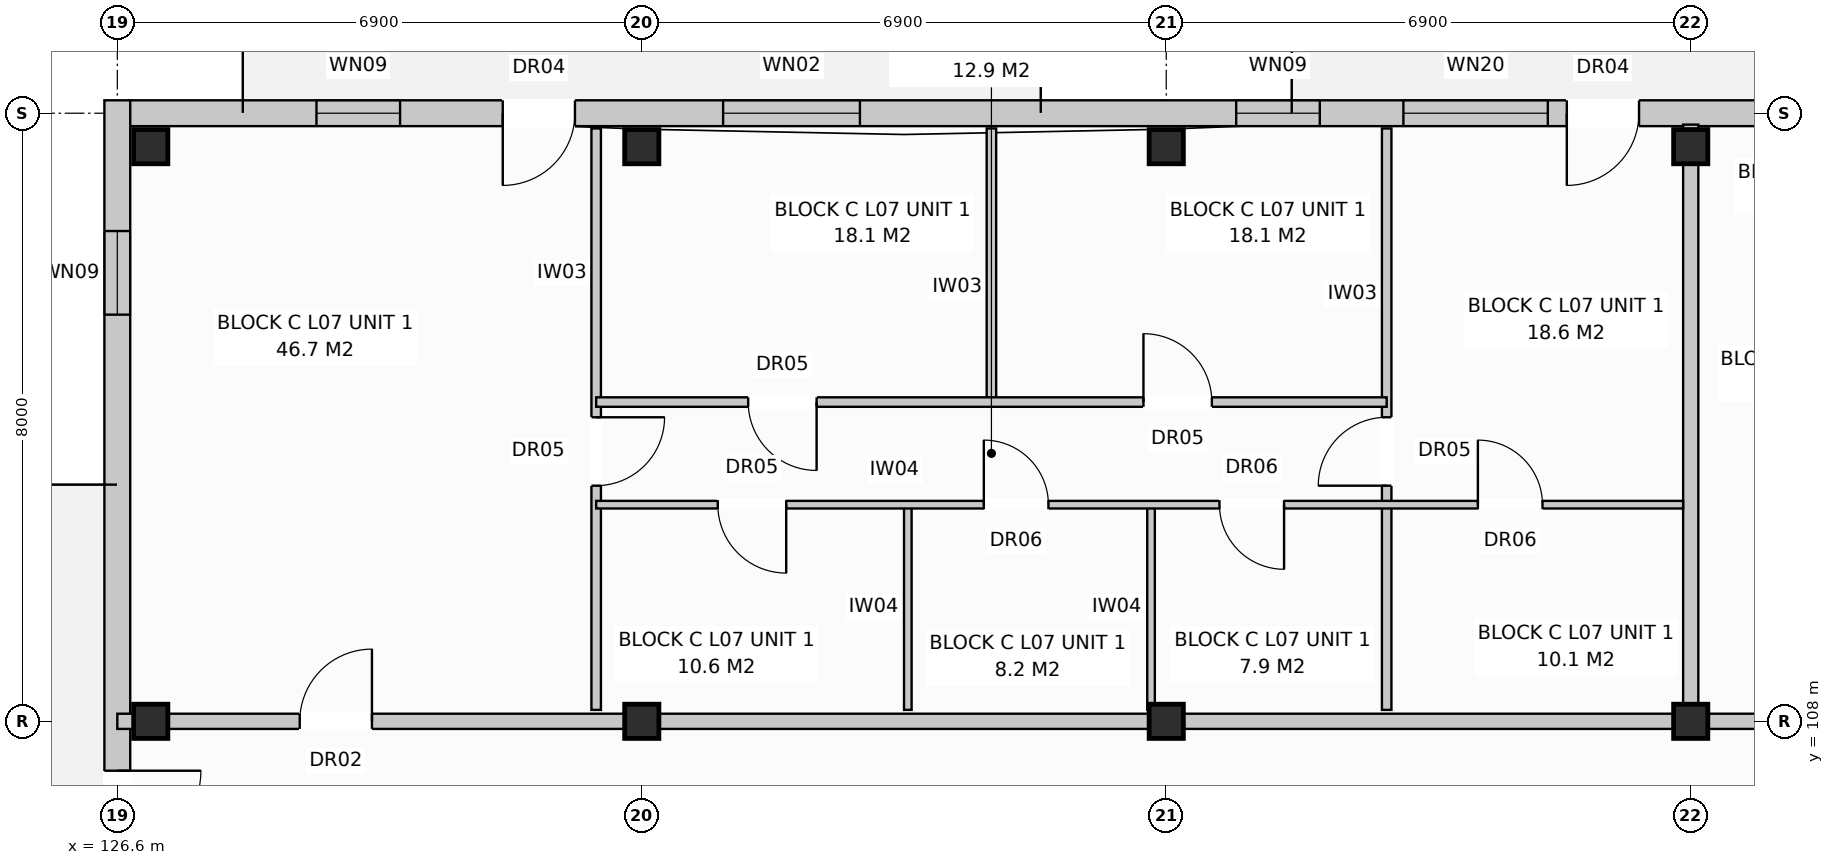
"""IFC4 building model, lengths in metres.
Left out: names, types, materials, properties, quantities, classifications, styles, units other than length and angle.
Written with IfcOpenShell. Run it as: python <this file> out.ifc"""

import sys

from ifc_helpers import new_model, si_unit, direction, frame, frame_2d, origin, origin_with_axes, origin_2d, place, context, subcontext, project, spatial, rectangle, extrude, element, fill, save


model = new_model("IFC4")
c1 = context("Model", 3, precision=1e-05, world=origin(), true_north=direction((0.0, 1.0)))
c2 = subcontext(c1, "Body", "Model", "MODEL_VIEW")
j1 = project(units=[si_unit("LENGTHUNIT", "METRE"), si_unit("PLANEANGLEUNIT", "RADIAN")], contexts=[c1])
p1 = place(None, origin())
s1 = spatial("IfcSite", under=j1, at=p1, CompositionType="ELEMENT")
p2 = place(p1, origin())
s2 = spatial("IfcBuilding", under=s1, at=p2, CompositionType="ELEMENT")
p3 = place(p2, frame((0.0, 0.0, 24.0)))
s3 = spatial("IfcBuildingStorey", under=s2, at=p3, CompositionType="ELEMENT", Elevation=24.0)
for number, where, z_axis, x_axis in (
    (1, (127.04, 108.0, 0.0), (0.0, 0.0, 1.0), (1.0, 0.0, 0.0)),
    (2, (127.04, 115.56, 0.0), (0.0, 0.0, 1.0), (1.0, 0.0, 0.0)),
    (3, (133.5, 108.0, 0.0), (0.0, 0.0, 1.0), (1.0, 0.0, 0.0)),
    (4, (133.5, 115.56, 0.0), (0.0, 0.0, 1.0), (1.0, 0.0, 0.0)),
    (5, (140.4, 108.0, 0.0), (0.0, 0.0, 1.0), (1.0, 0.0, 0.0)),
    (6, (140.4, 115.56, 0.0), (0.0, 0.0, 1.0), (1.0, 0.0, 0.0)),
    (7, (147.3, 108.0, 0.0), (0.0, 0.0, 1.0), (1.0, 0.0, 0.0)),
    (8, (147.3, 115.56, 0.0), (0.0, 0.0, 1.0), (1.0, 0.0, 0.0)),
):
    element("IfcColumn", number, at=place(p3, frame(where, z_axis=z_axis, x_axis=x_axis)), inside=s3, PredefinedType="COLUMN", context=c2, shape_type="SweptSolid", body=[
        extrude(rectangle(XDim=0.45, YDim=0.45, at=origin_2d()), origin(), (0.0, 0.0, 1.0), 3.2),
    ])
p4 = place(p3, frame((126.76, 116.0, 0.0), z_axis=(0.0, 0.0, 1.0), x_axis=(1.0, 0.0, 0.0)))
e9 = element("IfcWall", 9, at=p4, inside=s3, PredefinedType="STANDARD", context=c2, shape_type="SweptSolid", body=[
    extrude(rectangle(XDim=41.08, YDim=0.34, at=frame_2d((20.54, 0.0))), origin(), (0.0, 0.0, 1.0), 2.95),
])
p5 = place(p4, frame((4.911, 0.0, 0.0)))
e10 = element("IfcOpeningElement", 10, at=p5, cuts=e9, PredefinedType="OPENING", context=c2, shape_type="SweptSolid", body=[
    extrude(rectangle(XDim=0.95, YDim=2.1, at=frame_2d((0.475, 1.05))), frame((0.0, 0.182, 0.0), z_axis=(0.0, -1.0, 0.0), x_axis=(1.0, 0.0, 0.0)), (0.0, 0.0, 1.0), 0.364),
])
p6 = place(p4, frame((18.91, 0.0, 0.0)))
e11 = element("IfcOpeningElement", 11, at=p6, cuts=e9, PredefinedType="OPENING", context=c2, shape_type="SweptSolid", body=[
    extrude(rectangle(XDim=0.95, YDim=2.1, at=frame_2d((0.475, 1.05))), frame((0.0, 0.182, 0.0), z_axis=(0.0, -1.0, 0.0), x_axis=(1.0, 0.0, 0.0)), (0.0, 0.0, 1.0), 0.364),
])
p7 = place(p4, frame((30.411, 0.0, 0.0)))
e12 = element("IfcOpeningElement", 12, at=p7, cuts=e9, PredefinedType="OPENING", context=c2, shape_type="SweptSolid", body=[
    extrude(rectangle(XDim=0.95, YDim=2.1, at=frame_2d((0.475, 1.05))), frame((0.0, 0.182, 0.0), z_axis=(0.0, -1.0, 0.0), x_axis=(1.0, 0.0, 0.0)), (0.0, 0.0, 1.0), 0.364),
])
p8 = place(p4, frame((2.46, 0.0, 0.72)))
e13 = element("IfcOpeningElement", 13, at=p8, cuts=e9, PredefinedType="OPENING", context=c2, shape_type="SweptSolid", body=[
    extrude(rectangle(XDim=1.1, YDim=1.5, at=frame_2d((0.55, 0.75))), frame((0.0, 0.182, 0.0), z_axis=(0.0, -1.0, 0.0), x_axis=(1.0, 0.0, 0.0)), (0.0, 0.0, 1.0), 0.364),
])
p9 = place(p4, frame((7.81, 0.0, 0.8)))
e14 = element("IfcOpeningElement", 14, at=p9, cuts=e9, PredefinedType="OPENING", context=c2, shape_type="SweptSolid", body=[
    extrude(rectangle(XDim=1.8, YDim=1.7, at=frame_2d((0.9, 0.85))), frame((0.0, 0.182, 0.0), z_axis=(0.0, -1.0, 0.0), x_axis=(1.0, 0.0, 0.0)), (0.0, 0.0, 1.0), 0.364),
])
p10 = place(p4, frame((14.56, 0.0, 0.72)))
e15 = element("IfcOpeningElement", 15, at=p10, cuts=e9, PredefinedType="OPENING", context=c2, shape_type="SweptSolid", body=[
    extrude(rectangle(XDim=1.1, YDim=1.5, at=frame_2d((0.55, 0.75))), frame((0.0, 0.182, 0.0), z_axis=(0.0, -1.0, 0.0), x_axis=(1.0, 0.0, 0.0)), (0.0, 0.0, 1.0), 0.364),
])
p11 = place(p4, frame((16.76, 0.0, 0.8)))
e16 = element("IfcOpeningElement", 16, at=p11, cuts=e9, PredefinedType="OPENING", context=c2, shape_type="SweptSolid", body=[
    extrude(rectangle(XDim=1.9, YDim=1.85, at=frame_2d((0.95, 0.925))), frame((0.0, 0.182, 0.0), z_axis=(0.0, -1.0, 0.0), x_axis=(1.0, 0.0, 0.0)), (0.0, 0.0, 1.0), 0.364),
])
p12 = place(p4, frame((21.61, 0.0, 0.8)))
e17 = element("IfcOpeningElement", 17, at=p12, cuts=e9, PredefinedType="OPENING", context=c2, shape_type="SweptSolid", body=[
    extrude(rectangle(XDim=1.8, YDim=1.7, at=frame_2d((0.9, 0.85))), frame((0.0, 0.182, 0.0), z_axis=(0.0, -1.0, 0.0), x_axis=(1.0, 0.0, 0.0)), (0.0, 0.0, 1.0), 0.364),
])
p13 = place(p4, frame((25.36, 0.0, 0.72)))
e18 = element("IfcOpeningElement", 18, at=p13, cuts=e9, PredefinedType="OPENING", context=c2, shape_type="SweptSolid", body=[
    extrude(rectangle(XDim=1.1, YDim=1.5, at=frame_2d((0.55, 0.75))), frame((0.0, 0.182, 0.0), z_axis=(0.0, -1.0, 0.0), x_axis=(1.0, 0.0, 0.0)), (0.0, 0.0, 1.0), 0.364),
])
p14 = place(p4, frame((28.66, 0.0, 0.72)))
e19 = element("IfcOpeningElement", 19, at=p14, cuts=e9, PredefinedType="OPENING", context=c2, shape_type="SweptSolid", body=[
    extrude(rectangle(XDim=1.1, YDim=1.5, at=frame_2d((0.55, 0.75))), frame((0.0, 0.182, 0.0), z_axis=(0.0, -1.0, 0.0), x_axis=(1.0, 0.0, 0.0)), (0.0, 0.0, 1.0), 0.364),
])
p15 = place(p4, frame((32.01, 0.0, 0.8)))
e20 = element("IfcOpeningElement", 20, at=p15, cuts=e9, PredefinedType="OPENING", context=c2, shape_type="SweptSolid", body=[
    extrude(rectangle(XDim=1.8, YDim=1.7, at=frame_2d((0.9, 0.85))), frame((0.0, 0.182, 0.0), z_axis=(0.0, -1.0, 0.0), x_axis=(1.0, 0.0, 0.0)), (0.0, 0.0, 1.0), 0.364),
])
p16 = place(p4, frame((38.06, 0.0, 0.72)))
e21 = element("IfcOpeningElement", 21, at=p16, cuts=e9, PredefinedType="OPENING", context=c2, shape_type="SweptSolid", body=[
    extrude(rectangle(XDim=1.1, YDim=1.5, at=frame_2d((0.55, 0.75))), frame((0.0, 0.182, 0.0), z_axis=(0.0, -1.0, 0.0), x_axis=(1.0, 0.0, 0.0)), (0.0, 0.0, 1.0), 0.364),
])
p17 = place(p3, frame((126.6, 97.43, 0.0), z_axis=(0.0, 0.0, 1.0), x_axis=(0.0, 1.0, 0.0)))
e22 = element("IfcWall", 22, at=p17, inside=s3, PredefinedType="STANDARD", context=c2, shape_type="SweptSolid", body=[
    extrude(rectangle(XDim=18.74, YDim=0.34, at=frame_2d((9.37, 0.0))), origin(), (0.0, 0.0, 1.0), 2.95),
])
p18 = place(p17, frame((8.82, 0.0, 0.0)))
e23 = element("IfcOpeningElement", 23, at=p18, cuts=e22, PredefinedType="OPENING", context=c2, shape_type="SweptSolid", body=[
    extrude(rectangle(XDim=1.1, YDim=2.1, at=frame_2d((0.55, 1.05))), frame((0.0, 0.182, 0.0), z_axis=(0.0, -1.0, 0.0), x_axis=(1.0, 0.0, 0.0)), (0.0, 0.0, 1.0), 0.364),
])
p19 = place(p17, frame((15.92, 0.0, 0.72)))
e24 = element("IfcOpeningElement", 24, at=p19, cuts=e22, PredefinedType="OPENING", context=c2, shape_type="SweptSolid", body=[
    extrude(rectangle(XDim=1.1, YDim=1.5, at=frame_2d((0.55, 0.75))), frame((0.0, 0.182, 0.0), z_axis=(0.0, -1.0, 0.0), x_axis=(1.0, 0.0, 0.0)), (0.0, 0.0, 1.0), 0.364),
])
p20 = place(p3, frame((147.3, 108.15, 0.0), z_axis=(0.0, 0.0, 1.0), x_axis=(0.0, 1.0, 0.0)))
e25 = element("IfcWall", 25, at=p20, inside=s3, PredefinedType="PARTITIONING", context=c2, shape_type="SweptSolid", body=[
    extrude(rectangle(XDim=7.7, YDim=0.2, at=frame_2d((3.85, 0.0))), origin(), (0.0, 0.0, 1.0), 2.95),
])
p21 = place(p3, frame((126.6, 108.0, 0.0), z_axis=(0.0, 0.0, 1.0), x_axis=(1.0, 0.0, 0.0)))
e26 = element("IfcWall", 26, at=p21, inside=s3, PredefinedType="PARTITIONING", context=c2, shape_type="SweptSolid", body=[
    extrude(rectangle(XDim=20.7, YDim=0.2, at=frame_2d((10.35, 0.0))), origin(), (0.0, 0.0, 1.0), 2.39),
])
p22 = place(p21, frame((2.4, 0.0, 0.0)))
e27 = element("IfcOpeningElement", 27, at=p22, cuts=e26, PredefinedType="OPENING", context=c2, shape_type="SweptSolid", body=[
    extrude(rectangle(XDim=0.95, YDim=2.15, at=frame_2d((0.475, 1.075))), frame((0.0, 0.112, 0.0), z_axis=(0.0, -1.0, 0.0), x_axis=(1.0, 0.0, 0.0)), (0.0, 0.0, 1.0), 0.224),
])
p23 = place(p3, frame((132.9, 108.15, 0.0), z_axis=(0.0, 0.0, 1.0), x_axis=(0.0, 1.0, 0.0)))
e28 = element("IfcWall", 28, at=p23, inside=s3, PredefinedType="PARTITIONING", context=c2, shape_type="SweptSolid", body=[
    extrude(rectangle(XDim=7.65, YDim=0.125, at=frame_2d((3.825, 0.0))), origin(), (0.0, 0.0, 1.0), 2.95),
])
p24 = place(p23, frame((2.95, 0.0, 0.0)))
e29 = element("IfcOpeningElement", 29, at=p24, cuts=e28, PredefinedType="OPENING", context=c2, shape_type="SweptSolid", body=[
    extrude(rectangle(XDim=0.9, YDim=2.1, at=frame_2d((0.45, 1.05))), frame((0.0, 0.074, 0.0), z_axis=(0.0, -1.0, 0.0), x_axis=(1.0, 0.0, 0.0)), (0.0, 0.0, 1.0), 0.149),
])
for number, where, z_axis, x_axis in (
    (30, (137.0, 108.15, 0.0), (0.0, 0.0, 1.0), (0.0, 1.0, 0.0)),
    (31, (140.2, 108.15, 0.0), (0.0, 0.0, 1.0), (0.0, 1.0, 0.0)),
):
    element("IfcWall", number, at=place(p3, frame(where, z_axis=z_axis, x_axis=x_axis)), inside=s3, PredefinedType="PARTITIONING", context=c2, shape_type="SweptSolid", body=[
        extrude(rectangle(XDim=2.7, YDim=0.1, at=frame_2d((1.35, 0.0))), origin(), (0.0, 0.0, 1.0), 2.95),
    ])
p25 = place(p3, frame((138.1, 112.2, 0.0), z_axis=(0.0, 0.0, 1.0), x_axis=(0.0, 1.0, 0.0)))
e32 = element("IfcWall", 32, at=p25, inside=s3, PredefinedType="PARTITIONING", context=c2, shape_type="SweptSolid", body=[
    extrude(rectangle(XDim=3.6, YDim=0.125, at=frame_2d((1.8, 0.0))), origin(), (0.0, 0.0, 1.0), 2.59),
])
p26 = place(p3, frame((143.3, 108.15, 0.0), z_axis=(0.0, 0.0, 1.0), x_axis=(0.0, 1.0, 0.0)))
e33 = element("IfcWall", 33, at=p26, inside=s3, PredefinedType="PARTITIONING", context=c2, shape_type="SweptSolid", body=[
    extrude(rectangle(XDim=7.65, YDim=0.125, at=frame_2d((3.825, 0.0))), origin(), (0.0, 0.0, 1.0), 2.95),
])
p27 = place(p26, frame((2.95, 0.0, 0.0)))
e34 = element("IfcOpeningElement", 34, at=p27, cuts=e33, PredefinedType="OPENING", context=c2, shape_type="SweptSolid", body=[
    extrude(rectangle(XDim=0.9, YDim=2.1, at=frame_2d((0.45, 1.05))), frame((0.0, 0.074, 0.0), z_axis=(0.0, -1.0, 0.0), x_axis=(1.0, 0.0, 0.0)), (0.0, 0.0, 1.0), 0.149),
])
p28 = place(p3, frame((132.9, 110.85, 0.0), z_axis=(0.0, 0.0, 1.0), x_axis=(1.0, 0.0, 0.0)))
e35 = element("IfcWall", 35, at=p28, inside=s3, PredefinedType="PARTITIONING", context=c2, shape_type="SweptSolid", body=[
    extrude(rectangle(XDim=14.3, YDim=0.1, at=frame_2d((7.15, 0.0))), origin(), (0.0, 0.0, 1.0), 2.95),
])
p29 = place(p28, frame((1.6, 0.0, 0.0)))
e36 = element("IfcOpeningElement", 36, at=p29, cuts=e35, PredefinedType="OPENING", context=c2, shape_type="SweptSolid", body=[
    extrude(rectangle(XDim=0.9, YDim=2.1, at=frame_2d((0.45, 1.05))), frame((0.0, 0.062, 0.0), z_axis=(0.0, -1.0, 0.0), x_axis=(1.0, 0.0, 0.0)), (0.0, 0.0, 1.0), 0.124),
])
p30 = place(p28, frame((5.1, 0.0, 0.0)))
e37 = element("IfcOpeningElement", 37, at=p30, cuts=e35, PredefinedType="OPENING", context=c2, shape_type="SweptSolid", body=[
    extrude(rectangle(XDim=0.85, YDim=2.05, at=frame_2d((0.425, 1.025))), frame((0.0, 0.062, 0.0), z_axis=(0.0, -1.0, 0.0), x_axis=(1.0, 0.0, 0.0)), (0.0, 0.0, 1.0), 0.124),
])
p31 = place(p28, frame((8.2, 0.0, 0.0)))
e38 = element("IfcOpeningElement", 38, at=p31, cuts=e35, PredefinedType="OPENING", context=c2, shape_type="SweptSolid", body=[
    extrude(rectangle(XDim=0.85, YDim=2.05, at=frame_2d((0.425, 1.025))), frame((0.0, 0.062, 0.0), z_axis=(0.0, -1.0, 0.0), x_axis=(1.0, 0.0, 0.0)), (0.0, 0.0, 1.0), 0.124),
])
p32 = place(p28, frame((11.6, 0.0, 0.0)))
e39 = element("IfcOpeningElement", 39, at=p32, cuts=e35, PredefinedType="OPENING", context=c2, shape_type="SweptSolid", body=[
    extrude(rectangle(XDim=0.85, YDim=2.05, at=frame_2d((0.425, 1.025))), frame((0.0, 0.062, 0.0), z_axis=(0.0, -1.0, 0.0), x_axis=(1.0, 0.0, 0.0)), (0.0, 0.0, 1.0), 0.124),
])
p33 = place(p3, frame((132.9, 112.2, 0.0), z_axis=(0.0, 0.0, 1.0), x_axis=(1.0, 0.0, 0.0)))
e40 = element("IfcWall", 40, at=p33, inside=s3, PredefinedType="PARTITIONING", context=c2, shape_type="SweptSolid", body=[
    extrude(rectangle(XDim=10.4, YDim=0.125, at=frame_2d((5.2, 0.0))), origin(), (0.0, 0.0, 1.0), 2.95),
])
p34 = place(p33, frame((2.0, 0.0, 0.0)))
e41 = element("IfcOpeningElement", 41, at=p34, cuts=e40, PredefinedType="OPENING", context=c2, shape_type="SweptSolid", body=[
    extrude(rectangle(XDim=0.9, YDim=2.1, at=frame_2d((0.45, 1.05))), frame((0.0, 0.074, 0.0), z_axis=(0.0, -1.0, 0.0), x_axis=(1.0, 0.0, 0.0)), (0.0, 0.0, 1.0), 0.149),
])
p35 = place(p33, frame((7.2, 0.0, 0.0)))
e42 = element("IfcOpeningElement", 42, at=p35, cuts=e40, PredefinedType="OPENING", context=c2, shape_type="SweptSolid", body=[
    extrude(rectangle(XDim=0.9, YDim=2.1, at=frame_2d((0.45, 1.05))), frame((0.0, 0.074, 0.0), z_axis=(0.0, -1.0, 0.0), x_axis=(1.0, 0.0, 0.0)), (0.0, 0.0, 1.0), 0.149),
])
p36 = place(p3, frame((147.3, 108.0, 0.0), z_axis=(0.0, 0.0, 1.0), x_axis=(1.0, 0.0, 0.0)))
e43 = element("IfcWall", 43, at=p36, inside=s3, PredefinedType="PARTITIONING", context=c2, shape_type="SweptSolid", body=[
    extrude(rectangle(XDim=6.9, YDim=0.2, at=frame_2d((3.45, 0.0))), origin(), (0.0, 0.0, 1.0), 2.39),
])
p37 = place(p36, frame((2.0, 0.0, 0.0)))
e44 = element("IfcOpeningElement", 44, at=p37, cuts=e43, PredefinedType="OPENING", context=c2, shape_type="SweptSolid", body=[
    extrude(rectangle(XDim=0.95, YDim=2.15, at=frame_2d((0.475, 1.075))), frame((0.0, 0.112, 0.0), z_axis=(0.0, -1.0, 0.0), x_axis=(1.0, 0.0, 0.0)), (0.0, 0.0, 1.0), 0.224),
])
p38 = place(p5, frame((0.95, 0.0, 0.0), z_axis=(0.0, 0.0, 1.0), x_axis=(-1.0, 0.0, 0.0)))
e45 = element("IfcDoor", 45, at=p38, inside=s3, OperationType="SINGLE_SWING_LEFT", PredefinedType="DOOR", context=c2, shape_type="SweptSolid", body=[
    extrude(rectangle(XDim=0.95, YDim=2.1, at=frame_2d((0.475, 1.05))), frame((0.0, 0.025, 0.0), z_axis=(0.0, -1.0, 0.0), x_axis=(1.0, 0.0, 0.0)), (0.0, 0.0, 1.0), 0.05),
])
fill(e10, e45)
p39 = place(p6, frame((0.95, 0.0, 0.0), z_axis=(0.0, 0.0, 1.0), x_axis=(-1.0, 0.0, 0.0)))
e46 = element("IfcDoor", 46, at=p39, inside=s3, OperationType="SINGLE_SWING_LEFT", PredefinedType="DOOR", context=c2, shape_type="SweptSolid", body=[
    extrude(rectangle(XDim=0.95, YDim=2.1, at=frame_2d((0.475, 1.05))), frame((0.0, 0.025, 0.0), z_axis=(0.0, -1.0, 0.0), x_axis=(1.0, 0.0, 0.0)), (0.0, 0.0, 1.0), 0.05),
])
fill(e11, e46)
p40 = place(p8, origin_with_axes())
e47 = element("IfcWindow", 47, at=p40, inside=s3, PartitioningType="SINGLE_PANEL", PredefinedType="WINDOW", context=c2, shape_type="SweptSolid", body=[
    extrude(rectangle(XDim=1.1, YDim=1.5, at=frame_2d((0.55, 0.75))), frame((0.0, 0.03, 0.0), z_axis=(0.0, -1.0, 0.0), x_axis=(1.0, 0.0, 0.0)), (0.0, 0.0, 1.0), 0.06),
])
fill(e13, e47)
p41 = place(p9, origin_with_axes())
e48 = element("IfcWindow", 48, at=p41, inside=s3, PartitioningType="SINGLE_PANEL", PredefinedType="WINDOW", context=c2, shape_type="SweptSolid", body=[
    extrude(rectangle(XDim=1.8, YDim=1.7, at=frame_2d((0.9, 0.85))), frame((0.0, 0.03, 0.0), z_axis=(0.0, -1.0, 0.0), x_axis=(1.0, 0.0, 0.0)), (0.0, 0.0, 1.0), 0.06),
])
fill(e14, e48)
p42 = place(p10, origin_with_axes())
e49 = element("IfcWindow", 49, at=p42, inside=s3, PartitioningType="SINGLE_PANEL", PredefinedType="WINDOW", context=c2, shape_type="SweptSolid", body=[
    extrude(rectangle(XDim=1.1, YDim=1.5, at=frame_2d((0.55, 0.75))), frame((0.0, 0.03, 0.0), z_axis=(0.0, -1.0, 0.0), x_axis=(1.0, 0.0, 0.0)), (0.0, 0.0, 1.0), 0.06),
])
fill(e15, e49)
p43 = place(p11, origin_with_axes())
e50 = element("IfcWindow", 50, at=p43, inside=s3, PartitioningType="SINGLE_PANEL", PredefinedType="WINDOW", context=c2, shape_type="SweptSolid", body=[
    extrude(rectangle(XDim=1.9, YDim=1.85, at=frame_2d((0.95, 0.925))), frame((0.0, 0.03, 0.0), z_axis=(0.0, -1.0, 0.0), x_axis=(1.0, 0.0, 0.0)), (0.0, 0.0, 1.0), 0.06),
])
fill(e16, e50)
p44 = place(p18, frame((1.1, 0.0, 0.0), z_axis=(0.0, 0.0, 1.0), x_axis=(-1.0, 0.0, 0.0)))
e51 = element("IfcDoor", 51, at=p44, inside=s3, OperationType="SINGLE_SWING_RIGHT", PredefinedType="DOOR", context=c2, shape_type="SweptSolid", body=[
    extrude(rectangle(XDim=1.1, YDim=2.1, at=frame_2d((0.55, 1.05))), frame((0.0, 0.025, 0.0), z_axis=(0.0, -1.0, 0.0), x_axis=(1.0, 0.0, 0.0)), (0.0, 0.0, 1.0), 0.05),
])
fill(e23, e51)
p45 = place(p19, origin_with_axes())
e52 = element("IfcWindow", 52, at=p45, inside=s3, PartitioningType="SINGLE_PANEL", PredefinedType="WINDOW", context=c2, shape_type="SweptSolid", body=[
    extrude(rectangle(XDim=1.1, YDim=1.5, at=frame_2d((0.55, 0.75))), frame((0.0, 0.03, 0.0), z_axis=(0.0, -1.0, 0.0), x_axis=(1.0, 0.0, 0.0)), (0.0, 0.0, 1.0), 0.06),
])
fill(e24, e52)
p46 = place(p22, origin_with_axes())
e53 = element("IfcDoor", 53, at=p46, inside=s3, OperationType="SINGLE_SWING_RIGHT", PredefinedType="DOOR", context=c2, shape_type="SweptSolid", body=[
    extrude(rectangle(XDim=0.95, YDim=2.15, at=frame_2d((0.475, 1.075))), frame((0.0, 0.025, 0.0), z_axis=(0.0, -1.0, 0.0), x_axis=(1.0, 0.0, 0.0)), (0.0, 0.0, 1.0), 0.05),
])
fill(e27, e53)
p47 = place(p24, frame((0.9, 0.0, 0.0), z_axis=(0.0, 0.0, 1.0), x_axis=(-1.0, 0.0, 0.0)))
e54 = element("IfcDoor", 54, at=p47, inside=s3, OperationType="SINGLE_SWING_RIGHT", PredefinedType="DOOR", context=c2, shape_type="SweptSolid", body=[
    extrude(rectangle(XDim=0.9, YDim=2.1, at=frame_2d((0.45, 1.05))), frame((0.0, 0.025, 0.0), z_axis=(0.0, -1.0, 0.0), x_axis=(1.0, 0.0, 0.0)), (0.0, 0.0, 1.0), 0.05),
])
fill(e29, e54)
p48 = place(p27, origin_with_axes())
e55 = element("IfcDoor", 55, at=p48, inside=s3, OperationType="SINGLE_SWING_LEFT", PredefinedType="DOOR", context=c2, shape_type="SweptSolid", body=[
    extrude(rectangle(XDim=0.9, YDim=2.1, at=frame_2d((0.45, 1.05))), frame((0.0, 0.025, 0.0), z_axis=(0.0, -1.0, 0.0), x_axis=(1.0, 0.0, 0.0)), (0.0, 0.0, 1.0), 0.05),
])
fill(e34, e55)
p49 = place(p29, frame((0.9, 0.0, 0.0), z_axis=(0.0, 0.0, 1.0), x_axis=(-1.0, 0.0, 0.0)))
e56 = element("IfcDoor", 56, at=p49, inside=s3, OperationType="SINGLE_SWING_RIGHT", PredefinedType="DOOR", context=c2, shape_type="SweptSolid", body=[
    extrude(rectangle(XDim=0.9, YDim=2.1, at=frame_2d((0.45, 1.05))), frame((0.0, 0.025, 0.0), z_axis=(0.0, -1.0, 0.0), x_axis=(1.0, 0.0, 0.0)), (0.0, 0.0, 1.0), 0.05),
])
fill(e36, e56)
p50 = place(p30, origin_with_axes())
e57 = element("IfcDoor", 57, at=p50, inside=s3, OperationType="SINGLE_SWING_LEFT", PredefinedType="DOOR", context=c2, shape_type="SweptSolid", body=[
    extrude(rectangle(XDim=0.85, YDim=2.05, at=frame_2d((0.425, 1.025))), frame((0.0, 0.025, 0.0), z_axis=(0.0, -1.0, 0.0), x_axis=(1.0, 0.0, 0.0)), (0.0, 0.0, 1.0), 0.05),
])
fill(e37, e57)
p51 = place(p31, frame((0.85, 0.0, 0.0), z_axis=(0.0, 0.0, 1.0), x_axis=(-1.0, 0.0, 0.0)))
e58 = element("IfcDoor", 58, at=p51, inside=s3, OperationType="SINGLE_SWING_RIGHT", PredefinedType="DOOR", context=c2, shape_type="SweptSolid", body=[
    extrude(rectangle(XDim=0.85, YDim=2.05, at=frame_2d((0.425, 1.025))), frame((0.0, 0.025, 0.0), z_axis=(0.0, -1.0, 0.0), x_axis=(1.0, 0.0, 0.0)), (0.0, 0.0, 1.0), 0.05),
])
fill(e38, e58)
p52 = place(p32, origin_with_axes())
e59 = element("IfcDoor", 59, at=p52, inside=s3, OperationType="SINGLE_SWING_LEFT", PredefinedType="DOOR", context=c2, shape_type="SweptSolid", body=[
    extrude(rectangle(XDim=0.85, YDim=2.05, at=frame_2d((0.425, 1.025))), frame((0.0, 0.025, 0.0), z_axis=(0.0, -1.0, 0.0), x_axis=(1.0, 0.0, 0.0)), (0.0, 0.0, 1.0), 0.05),
])
fill(e39, e59)
p53 = place(p34, frame((0.9, 0.0, 0.0), z_axis=(0.0, 0.0, 1.0), x_axis=(-1.0, 0.0, 0.0)))
e60 = element("IfcDoor", 60, at=p53, inside=s3, OperationType="SINGLE_SWING_RIGHT", PredefinedType="DOOR", context=c2, shape_type="SweptSolid", body=[
    extrude(rectangle(XDim=0.9, YDim=2.1, at=frame_2d((0.45, 1.05))), frame((0.0, 0.025, 0.0), z_axis=(0.0, -1.0, 0.0), x_axis=(1.0, 0.0, 0.0)), (0.0, 0.0, 1.0), 0.05),
])
fill(e41, e60)
p54 = place(p35, origin_with_axes())
e61 = element("IfcDoor", 61, at=p54, inside=s3, OperationType="SINGLE_SWING_LEFT", PredefinedType="DOOR", context=c2, shape_type="SweptSolid", body=[
    extrude(rectangle(XDim=0.9, YDim=2.1, at=frame_2d((0.45, 1.05))), frame((0.0, 0.025, 0.0), z_axis=(0.0, -1.0, 0.0), x_axis=(1.0, 0.0, 0.0)), (0.0, 0.0, 1.0), 0.05),
])
fill(e42, e61)
save(model, sys.argv[1])
